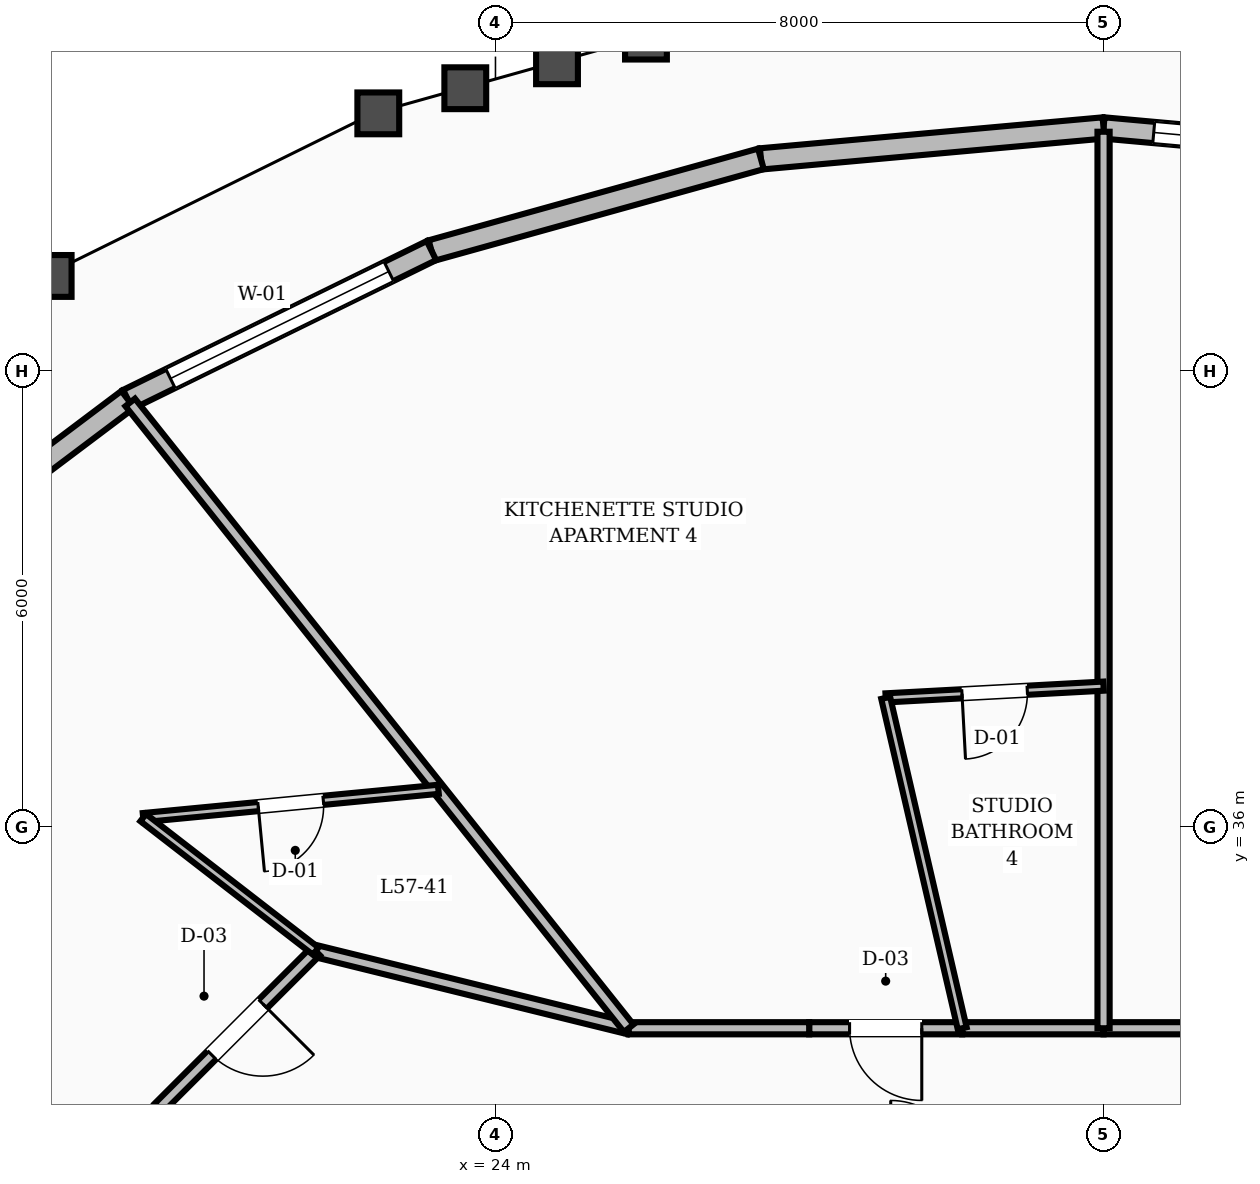
"""IFC4 building model, lengths in metres.
Left out: names, types, materials, properties, quantities, classifications, styles, units other than length and angle.
Written with IfcOpenShell. Run it as: python <this file> out.ifc"""

import sys

from ifc_helpers import new_model, si_unit, direction, frame, frame_2d, origin, place, context, subcontext, project, spatial, rectangle, extrude, element, fill, save


model = new_model("IFC4")
c1 = context("Model", 3, precision=1e-05, world=origin(), true_north=direction((0.0, 1.0)))
c2 = subcontext(c1, "Body", "Model", "MODEL_VIEW")
j1 = project(units=[si_unit("LENGTHUNIT", "METRE"), si_unit("PLANEANGLEUNIT", "RADIAN")], contexts=[c1])
p1 = place(None, origin())
s1 = spatial("IfcSite", under=j1, at=p1, CompositionType="ELEMENT")
p2 = place(p1, origin())
s2 = spatial("IfcBuilding", under=s1, at=p2, CompositionType="ELEMENT")
p3 = place(p2, frame((0.0, 0.0, 222.0)))
s3 = spatial("IfcBuildingStorey", under=s2, at=p3, CompositionType="ELEMENT", Elevation=222.0)
p4 = place(p3, frame((36.508, 44.787, 0.0), z_axis=(0.0, 0.0, 1.0), x_axis=(-0.995944333691, 0.089971574339, 0.0)))
e1 = element("IfcWall", 1, at=p4, inside=s3, PredefinedType="STANDARD", context=c2, shape_type="SweptSolid", body=[
    extrude(rectangle(XDim=4.526, YDim=0.28, at=frame_2d((2.263, 0.0))), origin(), (0.0, 0.0, 1.0), 2.88),
])
p5 = place(p4, frame((0.663, 0.0, 0.8)))
e2 = element("IfcOpeningElement", 2, at=p5, cuts=e1, PredefinedType="OPENING", context=c2, shape_type="SweptSolid", body=[
    extrude(rectangle(XDim=3.2, YDim=1.65, at=frame_2d((1.6, 0.825))), frame((0.0, 0.15, 0.0), z_axis=(0.0, -1.0, 0.0), x_axis=(1.0, 0.0, 0.0)), (0.0, 0.0, 1.0), 0.3),
])
p6 = place(p3, frame((32.0, 45.195, 0.0), z_axis=(0.0, 0.0, 1.0), x_axis=(-0.995944333691, -0.089971574339, 0.0)))
e3 = element("IfcWall", 3, at=p6, inside=s3, PredefinedType="STANDARD", context=c2, shape_type="SweptSolid", body=[
    extrude(rectangle(XDim=4.526, YDim=0.28, at=frame_2d((2.263, 0.0))), origin(), (0.0, 0.0, 1.0), 2.88),
])
p7 = place(p3, frame((27.492, 44.787, 0.0), z_axis=(0.0, 0.0, 1.0), x_axis=(-0.963397305611, -0.268077659535, 0.0)))
e4 = element("IfcWall", 4, at=p7, inside=s3, PredefinedType="STANDARD", context=c2, shape_type="SweptSolid", body=[
    extrude(rectangle(XDim=4.499, YDim=0.28, at=frame_2d((2.25, 0.0))), origin(), (0.0, 0.0, 1.0), 2.88),
])
p8 = place(p3, frame((23.158, 43.581, 0.0), z_axis=(0.0, 0.0, 1.0), x_axis=(-0.897868409718, -0.440263919519, 0.0)))
e5 = element("IfcWall", 5, at=p8, inside=s3, PredefinedType="STANDARD", context=c2, shape_type="SweptSolid", body=[
    extrude(rectangle(XDim=4.449, YDim=0.28, at=frame_2d((2.225, 0.0))), origin(), (0.0, 0.0, 1.0), 2.88),
])
p9 = place(p8, frame((0.625, 0.0, 0.8)))
e6 = element("IfcOpeningElement", 6, at=p9, cuts=e5, PredefinedType="OPENING", context=c2, shape_type="SweptSolid", body=[
    extrude(rectangle(XDim=3.2, YDim=1.65, at=frame_2d((1.6, 0.825))), frame((0.0, 0.15, 0.0), z_axis=(0.0, -1.0, 0.0), x_axis=(1.0, 0.0, 0.0)), (0.0, 0.0, 1.0), 0.3),
])
p10 = place(p3, frame((19.163, 41.623, 0.0), z_axis=(0.0, 0.0, 1.0), x_axis=(-0.798942565337, -0.601407330594, 0.0)))
e7 = element("IfcWall", 7, at=p10, inside=s3, PredefinedType="STANDARD", context=c2, shape_type="SweptSolid", body=[
    extrude(rectangle(XDim=4.383, YDim=0.28, at=frame_2d((2.191, 0.0))), origin(), (0.0, 0.0, 1.0), 2.88),
])
for number, where, z_axis, x_axis in (
    (8, (33.86, 33.35, 0.0), (0.0, 0.0, 1.0), (-1.0, 0.0, 0.0)),
    (9, (32.0, 33.35, 0.0), (0.0, 0.0, 1.0), (-1.0, 0.0, 0.0)),
):
    element("IfcWall", number, at=place(p3, frame(where, z_axis=z_axis, x_axis=x_axis)), inside=s3, PredefinedType="SOLIDWALL", context=c2, shape_type="SweptSolid", body=[
        extrude(rectangle(XDim=1.86, YDim=0.16, at=frame_2d((0.93, 0.0))), origin(), (0.0, 0.0, 1.0), 2.87),
    ])
p11 = place(p3, frame((30.14, 33.35, 0.0), z_axis=(0.0, 0.0, 1.0), x_axis=(-1.0, 0.0, 0.0)))
e10 = element("IfcWall", 10, at=p11, inside=s3, PredefinedType="SOLIDWALL", context=c2, shape_type="SweptSolid", body=[
    extrude(rectangle(XDim=2.013, YDim=0.16, at=frame_2d((1.006, 0.0))), origin(), (0.0, 0.0, 1.0), 2.87),
])
p12 = place(p11, frame((0.531, 0.0, 0.0)))
e11 = element("IfcOpeningElement", 11, at=p12, cuts=e10, PredefinedType="OPENING", context=c2, shape_type="SweptSolid", body=[
    extrude(rectangle(XDim=0.95, YDim=2.1, at=frame_2d((0.475, 1.05))), frame((0.0, 0.09, 0.0), z_axis=(0.0, -1.0, 0.0), x_axis=(1.0, 0.0, 0.0)), (0.0, 0.0, 1.0), 0.18),
])
p13 = place(p3, frame((28.127, 33.35, 0.0), z_axis=(0.0, 0.0, 1.0), x_axis=(-1.0, 0.0, 0.0)))
e12 = element("IfcWall", 12, at=p13, inside=s3, PredefinedType="SOLIDWALL", context=c2, shape_type="SweptSolid", body=[
    extrude(rectangle(XDim=2.375, YDim=0.16, at=frame_2d((1.188, 0.0))), origin(), (0.0, 0.0, 1.0), 2.87),
])
p14 = place(p3, frame((25.752, 33.35, 0.0), z_axis=(0.0, 0.0, 1.0), x_axis=(-0.970939799552, 0.239323850978, 0.0)))
e13 = element("IfcWall", 13, at=p14, inside=s3, PredefinedType="SOLIDWALL", context=c2, shape_type="SweptSolid", body=[
    extrude(rectangle(XDim=4.241, YDim=0.16, at=frame_2d((2.12, 0.0))), origin(), (0.0, 0.0, 1.0), 2.87),
])
p15 = place(p3, frame((21.635, 34.365, 0.0), z_axis=(0.0, 0.0, 1.0), x_axis=(-0.707106781187, -0.707106781187, 0.0)))
e14 = element("IfcWall", 14, at=p15, inside=s3, PredefinedType="SOLIDWALL", context=c2, shape_type="SweptSolid", body=[
    extrude(rectangle(XDim=2.916, YDim=0.16, at=frame_2d((1.458, 0.0))), origin(), (0.0, 0.0, 1.0), 2.87),
])
p16 = place(p15, frame((0.983, 0.0, 0.0)))
e15 = element("IfcOpeningElement", 15, at=p16, cuts=e14, PredefinedType="OPENING", context=c2, shape_type="SweptSolid", body=[
    extrude(rectangle(XDim=0.95, YDim=2.1, at=frame_2d((0.475, 1.05))), frame((0.0, 0.09, 0.0), z_axis=(0.0, -1.0, 0.0), x_axis=(1.0, 0.0, 0.0)), (0.0, 0.0, 1.0), 0.18),
])
p17 = place(p3, frame((32.0, 33.35, 0.0), z_axis=(0.0, 0.0, 1.0), x_axis=(0.0, 1.0, 0.0)))
e16 = element("IfcWall", 16, at=p17, inside=s3, PredefinedType="SOLIDWALL", context=c2, shape_type="SweptSolid", body=[
    extrude(rectangle(XDim=11.794, YDim=0.16, at=frame_2d((5.897, 0.0))), origin(), (0.0, 0.0, 1.0), 2.87),
])
p18 = place(p3, frame((32.0, 37.851, 0.0), z_axis=(0.0, 0.0, 1.0), x_axis=(-0.998549327461, -0.053844597009, 0.0)))
e17 = element("IfcWall", 17, at=p18, inside=s3, PredefinedType="PARTITIONING", context=c2, shape_type="SweptSolid", body=[
    extrude(rectangle(XDim=2.87, YDim=0.12, at=frame_2d((1.435, 0.0))), origin(), (0.0, 0.0, 1.0), 2.87),
])
p19 = place(p18, frame((1.005, 0.0, 0.0)))
e18 = element("IfcOpeningElement", 18, at=p19, cuts=e17, PredefinedType="OPENING", context=c2, shape_type="SweptSolid", body=[
    extrude(rectangle(XDim=0.86, YDim=2.1, at=frame_2d((0.43, 1.05))), frame((0.0, 0.07, 0.0), z_axis=(0.0, -1.0, 0.0), x_axis=(1.0, 0.0, 0.0)), (0.0, 0.0, 1.0), 0.14),
])
p20 = place(p3, frame((30.14, 33.35, 0.0), z_axis=(0.0, 0.0, 1.0), x_axis=(-0.225526929879, 0.974236934169, 0.0)))
e19 = element("IfcWall", 19, at=p20, inside=s3, PredefinedType="PARTITIONING", context=c2, shape_type="SweptSolid", body=[
    extrude(rectangle(XDim=4.461, YDim=0.12, at=frame_2d((2.23, 0.0))), origin(), (0.0, 0.0, 1.0), 2.87),
])
p21 = place(p3, frame((25.752, 33.35, 0.0), z_axis=(0.0, 0.0, 1.0), x_axis=(-0.623021929745, 0.782204369112, 0.0)))
e20 = element("IfcWall", 20, at=p21, inside=s3, PredefinedType="SOLIDWALL", context=c2, shape_type="SweptSolid", body=[
    extrude(rectangle(XDim=10.526, YDim=0.16, at=frame_2d((5.263, 0.0))), origin(), (0.0, 0.0, 1.0), 2.87),
])
p22 = place(p3, frame((23.249, 36.494, 0.0), z_axis=(0.0, 0.0, 1.0), x_axis=(-0.995435363516, -0.095438132111, 0.0)))
e21 = element("IfcWall", 21, at=p22, inside=s3, PredefinedType="PARTITIONING", context=c2, shape_type="SweptSolid", body=[
    extrude(rectangle(XDim=3.901, YDim=0.12, at=frame_2d((1.951, 0.0))), origin(), (0.0, 0.0, 1.0), 2.87),
])
p23 = place(p22, frame((1.521, 0.0, 0.0)))
e22 = element("IfcOpeningElement", 22, at=p23, cuts=e21, PredefinedType="OPENING", context=c2, shape_type="SweptSolid", body=[
    extrude(rectangle(XDim=0.86, YDim=2.1, at=frame_2d((0.43, 1.05))), frame((0.0, 0.07, 0.0), z_axis=(0.0, -1.0, 0.0), x_axis=(1.0, 0.0, 0.0)), (0.0, 0.0, 1.0), 0.14),
])
p24 = place(p3, frame((21.635, 34.365, 0.0), z_axis=(0.0, 0.0, 1.0), x_axis=(-0.790875111812, 0.61197757926, 0.0)))
e23 = element("IfcWall", 23, at=p24, inside=s3, PredefinedType="PARTITIONING", context=c2, shape_type="SweptSolid", body=[
    extrude(rectangle(XDim=2.87, YDim=0.12, at=frame_2d((1.435, 0.0))), origin(), (0.0, 0.0, 1.0), 2.87),
])
p25 = place(p5, origin())
e24 = element("IfcWindow", 24, at=p25, inside=s3, PartitioningType="SINGLE_PANEL", PredefinedType="WINDOW", context=c2, shape_type="SweptSolid", body=[
    extrude(rectangle(XDim=3.2, YDim=1.65, at=frame_2d((1.6, 0.825))), frame((0.0, 0.03, 0.0), z_axis=(0.0, -1.0, 0.0), x_axis=(1.0, 0.0, 0.0)), (0.0, 0.0, 1.0), 0.06),
])
fill(e2, e24)
p26 = place(p9, origin())
e25 = element("IfcWindow", 25, at=p26, inside=s3, PartitioningType="SINGLE_PANEL", PredefinedType="WINDOW", context=c2, shape_type="SweptSolid", body=[
    extrude(rectangle(XDim=3.2, YDim=1.65, at=frame_2d((1.6, 0.825))), frame((0.0, 0.03, 0.0), z_axis=(0.0, -1.0, 0.0), x_axis=(1.0, 0.0, 0.0)), (0.0, 0.0, 1.0), 0.06),
])
fill(e6, e25)
p27 = place(p19, origin())
e26 = element("IfcDoor", 26, at=p27, inside=s3, OperationType="SINGLE_SWING_RIGHT", PredefinedType="DOOR", context=c2, shape_type="SweptSolid", body=[
    extrude(rectangle(XDim=0.86, YDim=2.1, at=frame_2d((0.43, 1.05))), frame((0.0, 0.025, 0.0), z_axis=(0.0, -1.0, 0.0), x_axis=(1.0, 0.0, 0.0)), (0.0, 0.0, 1.0), 0.05),
])
fill(e18, e26)
p28 = place(p12, origin())
e27 = element("IfcDoor", 27, at=p28, inside=s3, OperationType="SINGLE_SWING_LEFT", PredefinedType="DOOR", context=c2, shape_type="SweptSolid", body=[
    extrude(rectangle(XDim=0.95, YDim=2.1, at=frame_2d((0.475, 1.05))), frame((0.0, 0.025, 0.0), z_axis=(0.0, -1.0, 0.0), x_axis=(1.0, 0.0, 0.0)), (0.0, 0.0, 1.0), 0.05),
])
fill(e11, e27)
p29 = place(p23, origin())
e28 = element("IfcDoor", 28, at=p29, inside=s3, OperationType="SINGLE_SWING_RIGHT", PredefinedType="DOOR", context=c2, shape_type="SweptSolid", body=[
    extrude(rectangle(XDim=0.86, YDim=2.1, at=frame_2d((0.43, 1.05))), frame((0.0, 0.025, 0.0), z_axis=(0.0, -1.0, 0.0), x_axis=(1.0, 0.0, 0.0)), (0.0, 0.0, 1.0), 0.05),
])
fill(e22, e28)
p30 = place(p16, origin())
e29 = element("IfcDoor", 29, at=p30, inside=s3, OperationType="SINGLE_SWING_LEFT", PredefinedType="DOOR", context=c2, shape_type="SweptSolid", body=[
    extrude(rectangle(XDim=0.95, YDim=2.1, at=frame_2d((0.475, 1.05))), frame((0.0, 0.025, 0.0), z_axis=(0.0, -1.0, 0.0), x_axis=(1.0, 0.0, 0.0)), (0.0, 0.0, 1.0), 0.05),
])
fill(e15, e29)
save(model, sys.argv[1])
